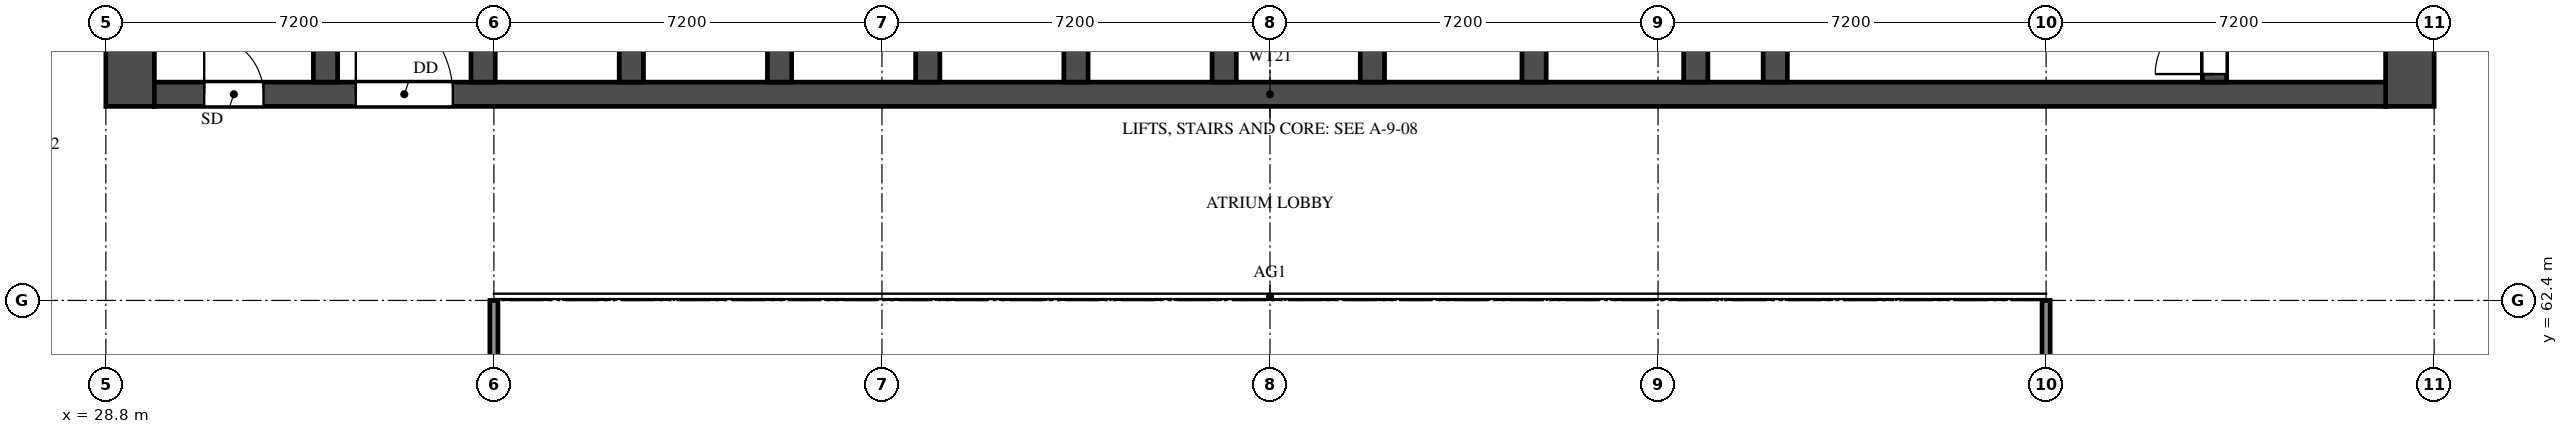
"""IFC4 building model, lengths in metres.
Left out: names, types, materials, properties, quantities, classifications, styles, units other than length and angle.
Written with IfcOpenShell. Run it as: python <this file> out.ifc"""

import sys

from ifc_helpers import new_model, si_unit, direction, frame, frame_2d, origin, place, context, subcontext, project, spatial, rectangle, extrude, element, fill, save


model = new_model("IFC4")
c1 = context("Model", 3, precision=1e-05, world=origin(), true_north=direction((0.0, 1.0)))
c2 = subcontext(c1, "Body", "Model", "MODEL_VIEW")
j1 = project(units=[si_unit("LENGTHUNIT", "METRE"), si_unit("PLANEANGLEUNIT", "RADIAN")], contexts=[c1])
p1 = place(None, origin())
s1 = spatial("IfcSite", under=j1, at=p1, CompositionType="ELEMENT")
p2 = place(p1, origin())
s2 = spatial("IfcBuilding", under=s1, at=p2, CompositionType="ELEMENT")
p3 = place(p2, frame((0.0, 0.0, 34.0)))
s3 = spatial("IfcBuildingStorey", under=s2, at=p3, CompositionType="ELEMENT", Elevation=34.0)
for number, where, z_axis, x_axis in (
    (1, (29.25, 66.0, 0.0), (0.0, 0.0, 1.0), (0.0, 1.0, 0.0)),
    (2, (71.55, 66.0, 0.0), (0.0, 0.0, 1.0), (0.0, 1.0, 0.0)),
):
    element("IfcWall", number, at=place(p3, frame(where, z_axis=z_axis, x_axis=x_axis)), inside=s3, PredefinedType="SHEAR", context=c2, shape_type="SweptSolid", body=[
        extrude(rectangle(XDim=12.0, YDim=0.9, at=frame_2d((6.0, 0.0))), origin(), (0.0, 0.0, 1.0), 3.18),
    ])
p4 = place(p3, frame((29.7, 66.225, 0.0), z_axis=(0.0, 0.0, 1.0), x_axis=(1.0, 0.0, 0.0)))
e3 = element("IfcWall", 3, at=p4, inside=s3, PredefinedType="SHEAR", context=c2, shape_type="SweptSolid", body=[
    extrude(rectangle(XDim=41.4, YDim=0.45, at=frame_2d((20.7, 0.0))), origin(), (0.0, 0.0, 1.0), 3.18),
])
p5 = place(p4, frame((0.925, 0.0, 0.0)))
e4 = element("IfcOpeningElement", 4, at=p5, cuts=e3, PredefinedType="OPENING", context=c2, shape_type="SweptSolid", body=[
    extrude(rectangle(XDim=1.1, YDim=2.1, at=frame_2d((0.55, 1.05))), frame((0.0, 0.235, 0.0), z_axis=(0.0, -1.0, 0.0), x_axis=(1.0, 0.0, 0.0)), (0.0, 0.0, 1.0), 0.47),
])
p6 = place(p4, frame((3.738, 0.0, 0.0)))
e5 = element("IfcOpeningElement", 5, at=p6, cuts=e3, PredefinedType="OPENING", context=c2, shape_type="SweptSolid", body=[
    extrude(rectangle(XDim=1.8, YDim=2.1, at=frame_2d((0.9, 1.05))), frame((0.0, 0.235, 0.0), z_axis=(0.0, -1.0, 0.0), x_axis=(1.0, 0.0, 0.0)), (0.0, 0.0, 1.0), 0.47),
])
p7 = place(p3, frame((32.875, 66.45, 0.0), z_axis=(0.0, 0.0, 1.0), x_axis=(0.0, 1.0, 0.0)))
e6 = element("IfcWall", 6, at=p7, inside=s3, PredefinedType="SHEAR", context=c2, shape_type="SweptSolid", body=[
    extrude(rectangle(XDim=10.65, YDim=0.45, at=frame_2d((5.325, 0.0))), origin(), (0.0, 0.0, 1.0), 3.18),
])
p8 = place(p3, frame((67.925, 66.45, 0.0), z_axis=(0.0, 0.0, 1.0), x_axis=(0.0, 1.0, 0.0)))
e7 = element("IfcWall", 7, at=p8, inside=s3, PredefinedType="SHEAR", context=c2, shape_type="SweptSolid", body=[
    extrude(rectangle(XDim=10.65, YDim=0.45, at=frame_2d((5.325, 0.0))), origin(), (0.0, 0.0, 1.0), 3.18),
])
p9 = place(p8, frame((0.15, 0.0, 0.0)))
e8 = element("IfcOpeningElement", 8, at=p9, cuts=e7, PredefinedType="OPENING", context=c2, shape_type="SweptSolid", body=[
    extrude(rectangle(XDim=1.1, YDim=2.1, at=frame_2d((0.55, 1.05))), frame((0.0, 0.235, 0.0), z_axis=(0.0, -1.0, 0.0), x_axis=(1.0, 0.0, 0.0)), (0.0, 0.0, 1.0), 0.47),
])
p10 = place(p3, frame((59.775, 66.45, 0.0), z_axis=(0.0, 0.0, 1.0), x_axis=(0.0, 1.0, 0.0)))
e9 = element("IfcWall", 9, at=p10, inside=s3, PredefinedType="SHEAR", context=c2, shape_type="SweptSolid", body=[
    extrude(rectangle(XDim=6.025, YDim=0.45, at=frame_2d((3.013, 0.0))), origin(), (0.0, 0.0, 1.0), 3.18),
])
p11 = place(p10, frame((3.85, 0.0, 0.0)))
e10 = element("IfcOpeningElement", 10, at=p11, cuts=e9, PredefinedType="OPENING", context=c2, shape_type="SweptSolid", body=[
    extrude(rectangle(XDim=1.2, YDim=2.1, at=frame_2d((0.6, 1.05))), frame((0.0, 0.235, 0.0), z_axis=(0.0, -1.0, 0.0), x_axis=(1.0, 0.0, 0.0)), (0.0, 0.0, 1.0), 0.47),
])
for number, where, z_axis, x_axis in (
    (11, (35.8, 66.45, 0.0), (0.0, 0.0, 1.0), (0.0, 1.0, 0.0)),
    (12, (38.55, 66.45, 0.0), (0.0, 0.0, 1.0), (0.0, 1.0, 0.0)),
    (13, (41.3, 66.45, 0.0), (0.0, 0.0, 1.0), (0.0, 1.0, 0.0)),
    (14, (44.05, 66.45, 0.0), (0.0, 0.0, 1.0), (0.0, 1.0, 0.0)),
    (15, (46.8, 66.45, 0.0), (0.0, 0.0, 1.0), (0.0, 1.0, 0.0)),
    (16, (49.55, 66.45, 0.0), (0.0, 0.0, 1.0), (0.0, 1.0, 0.0)),
    (17, (52.3, 66.45, 0.0), (0.0, 0.0, 1.0), (0.0, 1.0, 0.0)),
    (18, (55.3, 66.45, 0.0), (0.0, 0.0, 1.0), (0.0, 1.0, 0.0)),
    (19, (58.3, 66.45, 0.0), (0.0, 0.0, 1.0), (0.0, 1.0, 0.0)),
):
    element("IfcWall", number, at=place(p3, frame(where, z_axis=z_axis, x_axis=x_axis)), inside=s3, PredefinedType="SHEAR", context=c2, shape_type="SweptSolid", body=[
        extrude(rectangle(XDim=2.425, YDim=0.45, at=frame_2d((1.212, 0.0))), origin(), (0.0, 0.0, 1.0), 3.18),
    ])
for number, where, z_axis, x_axis in (
    (20, (36.0, 48.0, 0.0), (0.0, 0.0, 1.0), (0.0, 1.0, 0.0)),
    (21, (64.8, 48.0, 0.0), (0.0, 0.0, 1.0), (0.0, 1.0, 0.0)),
):
    element("IfcWall", number, at=place(p3, frame(where, z_axis=z_axis, x_axis=x_axis)), inside=s3, PredefinedType="SOLIDWALL", context=c2, shape_type="SweptSolid", body=[
        extrude(rectangle(XDim=14.4, YDim=0.15, at=frame_2d((7.2, 0.0))), origin(), (0.0, 0.0, 1.0), 2.28),
    ])
p12 = place(p5, origin())
e22 = element("IfcDoor", 22, at=p12, inside=s3, OperationType="SINGLE_SWING_LEFT", PredefinedType="DOOR", context=c2, shape_type="SweptSolid", body=[
    extrude(rectangle(XDim=1.1, YDim=2.1, at=frame_2d((0.55, 1.05))), frame((0.0, 0.025, 0.0), z_axis=(0.0, -1.0, 0.0), x_axis=(1.0, 0.0, 0.0)), (0.0, 0.0, 1.0), 0.05),
])
fill(e4, e22)
p13 = place(p9, origin())
e23 = element("IfcDoor", 23, at=p13, inside=s3, OperationType="SINGLE_SWING_LEFT", PredefinedType="DOOR", context=c2, shape_type="SweptSolid", body=[
    extrude(rectangle(XDim=1.1, YDim=2.1, at=frame_2d((0.55, 1.05))), frame((0.0, 0.025, 0.0), z_axis=(0.0, -1.0, 0.0), x_axis=(1.0, 0.0, 0.0)), (0.0, 0.0, 1.0), 0.05),
])
fill(e8, e23)
p14 = place(p6, origin())
e24 = element("IfcDoor", 24, at=p14, inside=s3, OperationType="DOUBLE_DOOR_SINGLE_SWING", PredefinedType="DOOR", context=c2, shape_type="SweptSolid", body=[
    extrude(rectangle(XDim=1.8, YDim=2.1, at=frame_2d((0.9, 1.05))), frame((0.0, 0.025, 0.0), z_axis=(0.0, -1.0, 0.0), x_axis=(1.0, 0.0, 0.0)), (0.0, 0.0, 1.0), 0.05),
])
fill(e5, e24)
save(model, sys.argv[1])
